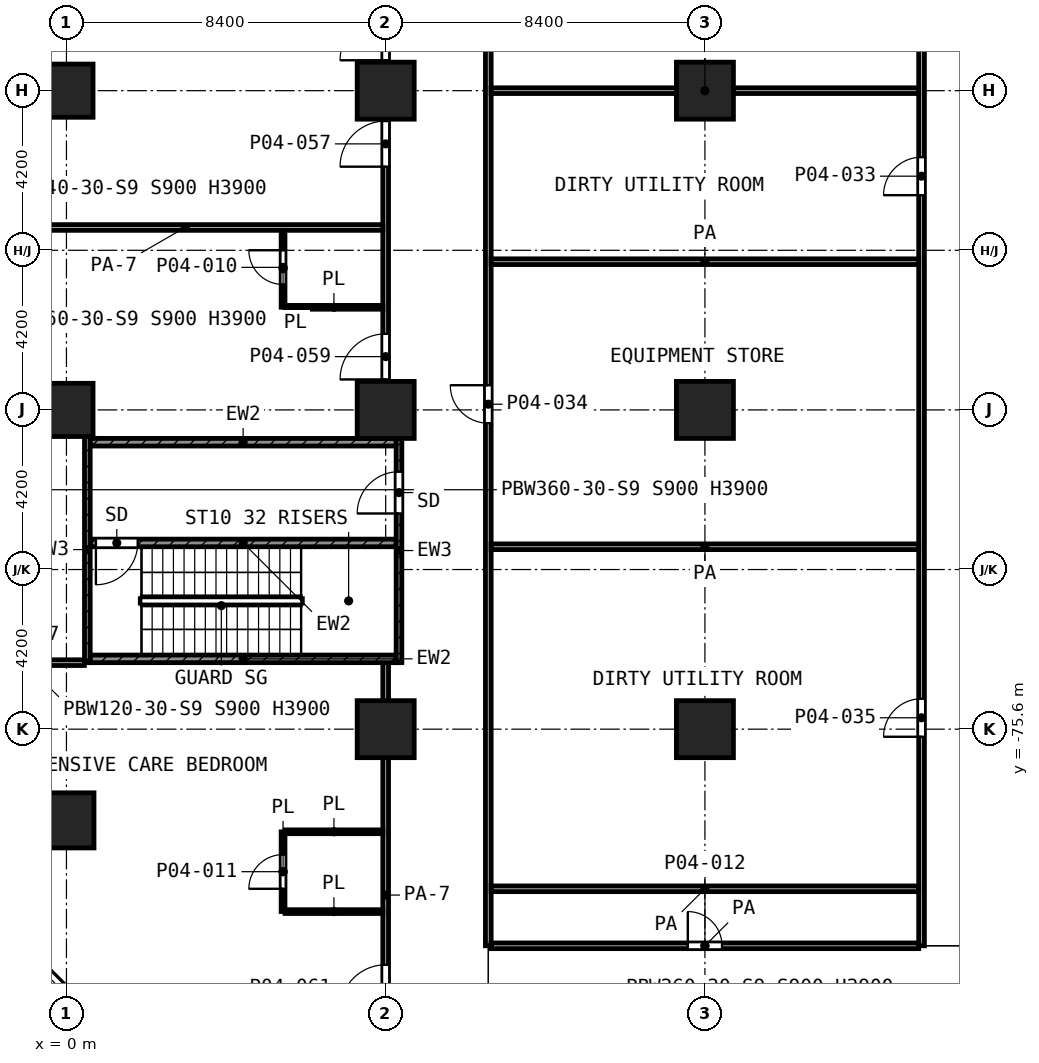
"""IFC4 building model, lengths in metres.
Left out: names, types, materials, properties, quantities, classifications, styles, units other than length and angle.
Written with IfcOpenShell. Run it as: python <this file> out.ifc"""

import sys

from ifc_helpers import new_model, si_unit, direction, frame, frame_2d, origin, origin_2d, place, context, subcontext, project, spatial, rectangle, extrude, element, fill, save


model = new_model("IFC4")
c1 = context("Model", 3, precision=1e-05, world=origin(), true_north=direction((0.0, 1.0)))
c2 = subcontext(c1, "Body", "Model", "MODEL_VIEW")
j1 = project(units=[si_unit("LENGTHUNIT", "METRE"), si_unit("PLANEANGLEUNIT", "RADIAN")], contexts=[c1])
p1 = place(None, origin())
s1 = spatial("IfcSite", under=j1, at=p1, CompositionType="ELEMENT")
p2 = place(p1, origin())
s2 = spatial("IfcBuilding", under=s1, at=p2, CompositionType="ELEMENT")
p3 = place(p2, frame((0.0, 0.0, 18.2)))
s3 = spatial("IfcBuildingStorey", under=s2, at=p3, CompositionType="ELEMENT", Elevation=18.2)
p4 = place(p3, frame((0.0, -58.8, 0.0), z_axis=(0.0, 0.0, 1.0), x_axis=(1.0, 0.0, 0.0)))
e1 = element("IfcColumn", 1, at=p4, inside=s3, PredefinedType="COLUMN", context=c2, shape_type="SweptSolid", body=[
    extrude(rectangle(XDim=1.4, YDim=1.4, at=origin_2d()), origin(), (0.0, 0.0, 1.0), 5.6),
])
for number, where, z_axis, x_axis in (
    (2, (8.4, -58.8, 0.0), (0.0, 0.0, 1.0), (1.0, 0.0, 0.0)),
    (3, (16.8, -58.8, 0.0), (0.0, 0.0, 1.0), (1.0, 0.0, 0.0)),
):
    element("IfcColumn", number, at=place(p3, frame(where, z_axis=z_axis, x_axis=x_axis)), inside=s3, PredefinedType="COLUMN", context=c2, shape_type="SweptSolid", body=[
        extrude(rectangle(XDim=1.5, YDim=1.5, at=origin_2d()), origin(), (0.0, 0.0, 1.0), 5.6),
    ])
p5 = place(p3, frame((0.0, -67.2, 0.0), z_axis=(0.0, 0.0, 1.0), x_axis=(1.0, 0.0, 0.0)))
e4 = element("IfcColumn", 4, at=p5, inside=s3, PredefinedType="COLUMN", context=c2, shape_type="SweptSolid", body=[
    extrude(rectangle(XDim=1.4, YDim=1.4, at=origin_2d()), origin(), (0.0, 0.0, 1.0), 5.6),
])
for number, where, z_axis, x_axis in (
    (5, (8.4, -67.2, 0.0), (0.0, 0.0, 1.0), (1.0, 0.0, 0.0)),
    (6, (16.8, -67.2, 0.0), (0.0, 0.0, 1.0), (1.0, 0.0, 0.0)),
    (7, (8.4, -75.6, 0.0), (0.0, 0.0, 1.0), (1.0, 0.0, 0.0)),
    (8, (16.8, -75.6, 0.0), (0.0, 0.0, 1.0), (1.0, 0.0, 0.0)),
):
    element("IfcColumn", number, at=place(p3, frame(where, z_axis=z_axis, x_axis=x_axis)), inside=s3, PredefinedType="COLUMN", context=c2, shape_type="SweptSolid", body=[
        extrude(rectangle(XDim=1.5, YDim=1.5, at=origin_2d()), origin(), (0.0, 0.0, 1.0), 5.6),
    ])
p6 = place(p3, frame((0.0, -78.0, 0.0), z_axis=(0.0, 0.0, 1.0), x_axis=(1.0, 0.0, 0.0)))
e9 = element("IfcColumn", 9, at=p6, inside=s3, PredefinedType="COLUMN", context=c2, shape_type="SweptSolid", body=[
    extrude(rectangle(XDim=1.45, YDim=1.45, at=origin_2d()), origin(), (0.0, 0.0, 1.0), 5.6),
])
p7 = place(p3, frame((-2.25, -80.338, 0.0), z_axis=(0.0, 0.0, 1.0), x_axis=(0.707106781187, -0.707106781187, 0.0)))
e10 = element("IfcWall", 10, at=p7, inside=s3, PredefinedType="SOLIDWALL", context=c2, shape_type="SweptSolid", body=[
    extrude(rectangle(XDim=8.361, YDim=0.3, at=frame_2d((4.181, 0.0))), origin(), (0.0, 0.0, 1.0), 5.05),
])
p8 = place(p7, frame((0.259, 0.0, 0.9)))
e11 = element("IfcOpeningElement", 11, at=p8, cuts=e10, PredefinedType="OPENING", context=c2, shape_type="SweptSolid", body=[
    extrude(rectangle(XDim=3.6, YDim=3.0, at=frame_2d((1.8, 1.5))), frame((0.0, 0.16, 0.0), z_axis=(0.0, -1.0, 0.0), x_axis=(1.0, 0.0, 0.0)), (0.0, 0.0, 1.0), 0.32),
])
p9 = place(p7, frame((4.502, 0.0, 0.9)))
e12 = element("IfcOpeningElement", 12, at=p9, cuts=e10, PredefinedType="OPENING", context=c2, shape_type="SweptSolid", body=[
    extrude(rectangle(XDim=3.6, YDim=3.0, at=frame_2d((1.8, 1.5))), frame((0.0, 0.16, 0.0), z_axis=(0.0, -1.0, 0.0), x_axis=(1.0, 0.0, 0.0)), (0.0, 0.0, 1.0), 0.32),
])
p10 = place(p3, frame((0.55, -73.85, 0.0), z_axis=(0.0, 0.0, 1.0), x_axis=(0.0, 1.0, 0.0)))
e13 = element("IfcWall", 13, at=p10, inside=s3, PredefinedType="SHEAR", context=c2, shape_type="SweptSolid", body=[
    extrude(rectangle(XDim=5.95, YDim=0.15, at=frame_2d((2.975, 0.0))), origin(), (0.0, 0.0, 1.0), 5.05),
])
p11 = place(p3, frame((8.75, -73.85, 0.0), z_axis=(0.0, 0.0, 1.0), x_axis=(0.0, 1.0, 0.0)))
e14 = element("IfcWall", 14, at=p11, inside=s3, PredefinedType="SHEAR", context=c2, shape_type="SweptSolid", body=[
    extrude(rectangle(XDim=5.9, YDim=0.15, at=frame_2d((2.95, 0.0))), origin(), (0.0, 0.0, 1.0), 5.05),
])
p12 = place(p11, frame((3.925, 0.0, 0.0)))
e15 = element("IfcOpeningElement", 15, at=p12, cuts=e14, PredefinedType="OPENING", context=c2, shape_type="SweptSolid", body=[
    extrude(rectangle(XDim=1.1, YDim=2.1, at=frame_2d((0.55, 1.05))), frame((0.0, 0.085, 0.0), z_axis=(0.0, -1.0, 0.0), x_axis=(1.0, 0.0, 0.0)), (0.0, 0.0, 1.0), 0.17),
])
p13 = place(p3, frame((0.625, -73.75, 0.0), z_axis=(0.0, 0.0, 1.0), x_axis=(1.0, 0.0, 0.0)))
e16 = element("IfcWall", 16, at=p13, inside=s3, PredefinedType="SHEAR", context=c2, shape_type="SweptSolid", body=[
    extrude(rectangle(XDim=8.05, YDim=0.2, at=frame_2d((4.025, 0.0))), origin(), (0.0, 0.0, 1.0), 5.05),
])
p14 = place(p3, frame((0.625, -70.7, 0.0), z_axis=(0.0, 0.0, 1.0), x_axis=(1.0, 0.0, 0.0)))
e17 = element("IfcWall", 17, at=p14, inside=s3, PredefinedType="SHEAR", context=c2, shape_type="SweptSolid", body=[
    extrude(rectangle(XDim=8.05, YDim=0.2, at=frame_2d((4.025, 0.0))), origin(), (0.0, 0.0, 1.0), 5.05),
])
p15 = place(p14, frame((0.15, 0.0, 0.0)))
e18 = element("IfcOpeningElement", 18, at=p15, cuts=e17, PredefinedType="OPENING", context=c2, shape_type="SweptSolid", body=[
    extrude(rectangle(XDim=1.1, YDim=2.1, at=frame_2d((0.55, 1.05))), frame((0.0, 0.11, 0.0), z_axis=(0.0, -1.0, 0.0), x_axis=(1.0, 0.0, 0.0)), (0.0, 0.0, 1.0), 0.22),
])
p16 = place(p3, frame((0.625, -68.05, 0.0), z_axis=(0.0, 0.0, 1.0), x_axis=(1.0, 0.0, 0.0)))
e19 = element("IfcWall", 19, at=p16, inside=s3, PredefinedType="SHEAR", context=c2, shape_type="SweptSolid", body=[
    extrude(rectangle(XDim=8.05, YDim=0.2, at=frame_2d((4.025, 0.0))), origin(), (0.0, 0.0, 1.0), 5.05),
])
p17 = place(p3, frame((5.751, -80.4, 0.0), z_axis=(0.0, 0.0, 1.0), x_axis=(1.0, 0.0, 0.0)))
e20 = element("IfcWall", 20, at=p17, inside=s3, PredefinedType="PARTITIONING", context=c2, shape_type="SweptSolid", body=[
    extrude(rectangle(XDim=2.574, YDim=0.1, at=frame_2d((1.287, 0.0))), origin(), (0.0, 0.0, 1.0), 5.05),
])
p18 = place(p3, frame((5.752, -78.3, 0.0), z_axis=(0.0, 0.0, 1.0), x_axis=(1.0, 0.0, 0.0)))
e21 = element("IfcWall", 21, at=p18, inside=s3, PredefinedType="PARTITIONING", context=c2, shape_type="SweptSolid", body=[
    extrude(rectangle(XDim=2.573, YDim=0.1, at=frame_2d((1.287, 0.0))), origin(), (0.0, 0.0, 1.0), 5.05),
])
p19 = place(p3, frame((5.751, -64.5, 0.0), z_axis=(0.0, 0.0, 1.0), x_axis=(1.0, 0.0, 0.0)))
e22 = element("IfcWall", 22, at=p19, inside=s3, PredefinedType="PARTITIONING", context=c2, shape_type="SweptSolid", body=[
    extrude(rectangle(XDim=2.574, YDim=0.1, at=frame_2d((1.287, 0.0))), origin(), (0.0, 0.0, 1.0), 5.05),
])
p20 = place(p3, frame((5.7, -80.398, 0.0), z_axis=(0.0, 0.0, 1.0), x_axis=(0.0, 1.0, 0.0)))
e23 = element("IfcWall", 23, at=p20, inside=s3, PredefinedType="PARTITIONING", context=c2, shape_type="SweptSolid", body=[
    extrude(rectangle(XDim=2.096, YDim=0.1, at=frame_2d((1.048, 0.0))), origin(), (0.0, 0.0, 1.0), 5.05),
])
p21 = place(p20, frame((0.598, 0.0, 0.0)))
e24 = element("IfcOpeningElement", 24, at=p21, cuts=e23, PredefinedType="OPENING", context=c2, shape_type="SweptSolid", body=[
    extrude(rectangle(XDim=0.9, YDim=2.1, at=frame_2d((0.45, 1.05))), frame((0.0, 0.06, 0.0), z_axis=(0.0, -1.0, 0.0), x_axis=(1.0, 0.0, 0.0)), (0.0, 0.0, 1.0), 0.12),
])
p22 = place(p3, frame((5.7, -64.498, 0.0), z_axis=(0.0, 0.0, 1.0), x_axis=(0.0, 1.0, 0.0)))
e25 = element("IfcWall", 25, at=p22, inside=s3, PredefinedType="PARTITIONING", context=c2, shape_type="SweptSolid", body=[
    extrude(rectangle(XDim=2.023, YDim=0.1, at=frame_2d((1.011, 0.0))), origin(), (0.0, 0.0, 1.0), 5.05),
])
p23 = place(p22, frame((0.599, 0.0, 0.0)))
e26 = element("IfcOpeningElement", 26, at=p23, cuts=e25, PredefinedType="OPENING", context=c2, shape_type="SweptSolid", body=[
    extrude(rectangle(XDim=0.9, YDim=2.1, at=frame_2d((0.45, 1.05))), frame((0.0, 0.06, 0.0), z_axis=(0.0, -1.0, 0.0), x_axis=(1.0, 0.0, 0.0)), (0.0, 0.0, 1.0), 0.12),
])
p24 = place(p3, frame((11.175, -81.3, 0.0), z_axis=(0.0, 0.0, 1.0), x_axis=(1.0, 0.0, 0.0)))
e27 = element("IfcWall", 27, at=p24, inside=s3, PredefinedType="PARTITIONING", context=c2, shape_type="SweptSolid", body=[
    extrude(rectangle(XDim=11.25, YDim=0.15, at=frame_2d((5.625, 0.0))), origin(), (0.0, 0.0, 1.0), 5.05),
])
p25 = place(p24, frame((5.175, 0.0, 0.0)))
e28 = element("IfcOpeningElement", 28, at=p25, cuts=e27, PredefinedType="OPENING", context=c2, shape_type="SweptSolid", body=[
    extrude(rectangle(XDim=0.9, YDim=2.1, at=frame_2d((0.45, 1.05))), frame((0.0, 0.085, 0.0), z_axis=(0.0, -1.0, 0.0), x_axis=(1.0, 0.0, 0.0)), (0.0, 0.0, 1.0), 0.17),
])
p26 = place(p3, frame((11.175, -79.8, 0.0), z_axis=(0.0, 0.0, 1.0), x_axis=(1.0, 0.0, 0.0)))
e29 = element("IfcWall", 29, at=p26, inside=s3, PredefinedType="PARTITIONING", context=c2, shape_type="SweptSolid", body=[
    extrude(rectangle(XDim=11.25, YDim=0.15, at=frame_2d((5.625, 0.0))), origin(), (0.0, 0.0, 1.0), 5.05),
])
p27 = place(p3, frame((-2.08, -73.85, 0.0), z_axis=(0.0, 0.0, 1.0), x_axis=(1.0, 0.0, 0.0)))
e30 = element("IfcWall", 30, at=p27, inside=s3, PredefinedType="PARTITIONING", context=c2, shape_type="SweptSolid", body=[
    extrude(rectangle(XDim=2.552, YDim=0.15, at=frame_2d((1.276, 0.0))), origin(), (0.0, 0.0, 1.0), 3.65),
])
for number, where, z_axis, x_axis in (
    (31, (11.175, -70.8, 0.0), (0.0, 0.0, 1.0), (1.0, 0.0, 0.0)),
    (32, (11.175, -63.3, 0.0), (0.0, 0.0, 1.0), (1.0, 0.0, 0.0)),
):
    element("IfcWall", number, at=place(p3, frame(where, z_axis=z_axis, x_axis=x_axis)), inside=s3, PredefinedType="PARTITIONING", context=c2, shape_type="SweptSolid", body=[
        extrude(rectangle(XDim=11.25, YDim=0.15, at=frame_2d((5.625, 0.0))), origin(), (0.0, 0.0, 1.0), 5.05),
    ])
p28 = place(p3, frame((-2.08, -62.4, 0.0), z_axis=(0.0, 0.0, 1.0), x_axis=(1.0, 0.0, 0.0)))
e33 = element("IfcWall", 33, at=p28, inside=s3, PredefinedType="PARTITIONING", context=c2, shape_type="SweptSolid", body=[
    extrude(rectangle(XDim=10.405, YDim=0.15, at=frame_2d((5.203, 0.0))), origin(), (0.0, 0.0, 1.0), 3.65),
])
p29 = place(p3, frame((11.175, -58.8, 0.0), z_axis=(0.0, 0.0, 1.0), x_axis=(1.0, 0.0, 0.0)))
e34 = element("IfcWall", 34, at=p29, inside=s3, PredefinedType="PARTITIONING", context=c2, shape_type="SweptSolid", body=[
    extrude(rectangle(XDim=11.25, YDim=0.15, at=frame_2d((5.625, 0.0))), origin(), (0.0, 0.0, 1.0), 5.05),
])
p30 = place(p3, frame((8.4, -86.08, 0.0), z_axis=(0.0, 0.0, 1.0), x_axis=(0.0, 1.0, 0.0)))
e35 = element("IfcWall", 35, at=p30, inside=s3, PredefinedType="PARTITIONING", context=c2, shape_type="SweptSolid", body=[
    extrude(rectangle(XDim=12.23, YDim=0.15, at=frame_2d((6.115, 0.0))), origin(), (0.0, 0.0, 1.0), 3.65),
])
p31 = place(p30, frame((1.08, 0.0, 0.0)))
e36 = element("IfcOpeningElement", 36, at=p31, cuts=e35, PredefinedType="OPENING", context=c2, shape_type="SweptSolid", body=[
    extrude(rectangle(XDim=1.2, YDim=2.1, at=frame_2d((0.6, 1.05))), frame((0.0, 0.085, 0.0), z_axis=(0.0, -1.0, 0.0), x_axis=(1.0, 0.0, 0.0)), (0.0, 0.0, 1.0), 0.17),
])
p32 = place(p30, frame((3.08, 0.0, 0.0)))
e37 = element("IfcOpeningElement", 37, at=p32, cuts=e35, PredefinedType="OPENING", context=c2, shape_type="SweptSolid", body=[
    extrude(rectangle(XDim=1.2, YDim=2.1, at=frame_2d((0.6, 1.05))), frame((0.0, 0.085, 0.0), z_axis=(0.0, -1.0, 0.0), x_axis=(1.0, 0.0, 0.0)), (0.0, 0.0, 1.0), 0.17),
])
p33 = place(p3, frame((8.4, -67.947, 0.0), z_axis=(0.0, 0.0, 1.0), x_axis=(0.0, 1.0, 0.0)))
e38 = element("IfcWall", 38, at=p33, inside=s3, PredefinedType="PARTITIONING", context=c2, shape_type="SweptSolid", body=[
    extrude(rectangle(XDim=25.597, YDim=0.15, at=frame_2d((12.798, 0.0))), origin(), (0.0, 0.0, 1.0), 5.05),
])
p34 = place(p33, frame((18.347, 0.0, 0.0)))
e39 = element("IfcOpeningElement", 39, at=p34, cuts=e38, PredefinedType="OPENING", context=c2, shape_type="SweptSolid", body=[
    extrude(rectangle(XDim=1.2, YDim=2.1, at=frame_2d((0.6, 1.05))), frame((0.0, 0.085, 0.0), z_axis=(0.0, -1.0, 0.0), x_axis=(1.0, 0.0, 0.0)), (0.0, 0.0, 1.0), 0.17),
])
p35 = place(p33, frame((7.147, 0.0, 0.0)))
e40 = element("IfcOpeningElement", 40, at=p35, cuts=e38, PredefinedType="OPENING", context=c2, shape_type="SweptSolid", body=[
    extrude(rectangle(XDim=1.2, YDim=2.1, at=frame_2d((0.6, 1.05))), frame((0.0, 0.085, 0.0), z_axis=(0.0, -1.0, 0.0), x_axis=(1.0, 0.0, 0.0)), (0.0, 0.0, 1.0), 0.17),
])
p36 = place(p33, frame((9.947, 0.0, 0.0)))
e41 = element("IfcOpeningElement", 41, at=p36, cuts=e38, PredefinedType="OPENING", context=c2, shape_type="SweptSolid", body=[
    extrude(rectangle(XDim=1.2, YDim=2.1, at=frame_2d((0.6, 1.05))), frame((0.0, 0.085, 0.0), z_axis=(0.0, -1.0, 0.0), x_axis=(1.0, 0.0, 0.0)), (0.0, 0.0, 1.0), 0.17),
])
p37 = place(p33, frame((1.549, 0.0, 0.0)))
e42 = element("IfcOpeningElement", 42, at=p37, cuts=e38, PredefinedType="OPENING", context=c2, shape_type="SweptSolid", body=[
    extrude(rectangle(XDim=1.2, YDim=2.1, at=frame_2d((0.6, 1.05))), frame((0.0, 0.085, 0.0), z_axis=(0.0, -1.0, 0.0), x_axis=(1.0, 0.0, 0.0)), (0.0, 0.0, 1.0), 0.17),
])
p38 = place(p3, frame((11.1, -81.3, 0.0), z_axis=(0.0, 0.0, 1.0), x_axis=(0.0, 1.0, 0.0)))
e43 = element("IfcWall", 43, at=p38, inside=s3, PredefinedType="PARTITIONING", context=c2, shape_type="SweptSolid", body=[
    extrude(rectangle(XDim=51.9, YDim=0.15, at=frame_2d((25.95, 0.0))), origin(), (0.0, 0.0, 1.0), 5.05),
])
p39 = place(p38, frame((34.6, 0.0, 0.0)))
e44 = element("IfcOpeningElement", 44, at=p39, cuts=e43, PredefinedType="OPENING", context=c2, shape_type="SweptSolid", body=[
    extrude(rectangle(XDim=1.0, YDim=2.1, at=frame_2d((0.5, 1.05))), frame((0.0, 0.085, 0.0), z_axis=(0.0, -1.0, 0.0), x_axis=(1.0, 0.0, 0.0)), (0.0, 0.0, 1.0), 0.17),
])
p40 = place(p38, frame((26.2, 0.0, 0.0)))
e45 = element("IfcOpeningElement", 45, at=p40, cuts=e43, PredefinedType="OPENING", context=c2, shape_type="SweptSolid", body=[
    extrude(rectangle(XDim=1.0, YDim=2.1, at=frame_2d((0.5, 1.05))), frame((0.0, 0.085, 0.0), z_axis=(0.0, -1.0, 0.0), x_axis=(1.0, 0.0, 0.0)), (0.0, 0.0, 1.0), 0.17),
])
p41 = place(p38, frame((13.75, 0.0, 0.0)))
e46 = element("IfcOpeningElement", 46, at=p41, cuts=e43, PredefinedType="OPENING", context=c2, shape_type="SweptSolid", body=[
    extrude(rectangle(XDim=1.0, YDim=2.1, at=frame_2d((0.5, 1.05))), frame((0.0, 0.085, 0.0), z_axis=(0.0, -1.0, 0.0), x_axis=(1.0, 0.0, 0.0)), (0.0, 0.0, 1.0), 0.17),
])
p42 = place(p3, frame((22.5, -81.3, 0.0), z_axis=(0.0, 0.0, 1.0), x_axis=(0.0, 1.0, 0.0)))
e47 = element("IfcWall", 47, at=p42, inside=s3, PredefinedType="PARTITIONING", context=c2, shape_type="SweptSolid", body=[
    extrude(rectangle(XDim=56.1, YDim=0.15, at=frame_2d((28.05, 0.0))), origin(), (0.0, 0.0, 1.0), 5.05),
])
p43 = place(p42, frame((51.4, 0.0, 0.0)))
e48 = element("IfcOpeningElement", 48, at=p43, cuts=e47, PredefinedType="OPENING", context=c2, shape_type="SweptSolid", body=[
    extrude(rectangle(XDim=1.0, YDim=2.1, at=frame_2d((0.5, 1.05))), frame((0.0, 0.085, 0.0), z_axis=(0.0, -1.0, 0.0), x_axis=(1.0, 0.0, 0.0)), (0.0, 0.0, 1.0), 0.17),
])
p44 = place(p42, frame((43.0, 0.0, 0.0)))
e49 = element("IfcOpeningElement", 49, at=p44, cuts=e47, PredefinedType="OPENING", context=c2, shape_type="SweptSolid", body=[
    extrude(rectangle(XDim=1.0, YDim=2.1, at=frame_2d((0.5, 1.05))), frame((0.0, 0.085, 0.0), z_axis=(0.0, -1.0, 0.0), x_axis=(1.0, 0.0, 0.0)), (0.0, 0.0, 1.0), 0.17),
])
p45 = place(p42, frame((19.75, 0.0, 0.0)))
e50 = element("IfcOpeningElement", 50, at=p45, cuts=e47, PredefinedType="OPENING", context=c2, shape_type="SweptSolid", body=[
    extrude(rectangle(XDim=1.0, YDim=2.1, at=frame_2d((0.5, 1.05))), frame((0.0, 0.085, 0.0), z_axis=(0.0, -1.0, 0.0), x_axis=(1.0, 0.0, 0.0)), (0.0, 0.0, 1.0), 0.17),
])
p46 = place(p42, frame((5.5, 0.0, 0.0)))
e51 = element("IfcOpeningElement", 51, at=p46, cuts=e47, PredefinedType="OPENING", context=c2, shape_type="SweptSolid", body=[
    extrude(rectangle(XDim=1.0, YDim=2.1, at=frame_2d((0.5, 1.05))), frame((0.0, 0.085, 0.0), z_axis=(0.0, -1.0, 0.0), x_axis=(1.0, 0.0, 0.0)), (0.0, 0.0, 1.0), 0.17),
])
p47 = place(p8, origin())
e52 = element("IfcWindow", 52, at=p47, inside=s3, PartitioningType="SINGLE_PANEL", PredefinedType="WINDOW", context=c2, shape_type="SweptSolid", body=[
    extrude(rectangle(XDim=3.6, YDim=3.0, at=frame_2d((1.8, 1.5))), frame((0.0, 0.03, 0.0), z_axis=(0.0, -1.0, 0.0), x_axis=(1.0, 0.0, 0.0)), (0.0, 0.0, 1.0), 0.06),
])
fill(e11, e52)
p48 = place(p15, frame((1.1, 0.0, 0.0), z_axis=(0.0, 0.0, 1.0), x_axis=(-1.0, 0.0, 0.0)))
e53 = element("IfcDoor", 53, at=p48, inside=s3, OperationType="SINGLE_SWING_LEFT", PredefinedType="DOOR", context=c2, shape_type="SweptSolid", body=[
    extrude(rectangle(XDim=1.1, YDim=2.1, at=frame_2d((0.55, 1.05))), frame((0.0, 0.025, 0.0), z_axis=(0.0, -1.0, 0.0), x_axis=(1.0, 0.0, 0.0)), (0.0, 0.0, 1.0), 0.05),
])
fill(e18, e53)
p49 = place(p12, origin())
e54 = element("IfcDoor", 54, at=p49, inside=s3, OperationType="SINGLE_SWING_LEFT", PredefinedType="DOOR", context=c2, shape_type="SweptSolid", body=[
    extrude(rectangle(XDim=1.1, YDim=2.1, at=frame_2d((0.55, 1.05))), frame((0.0, 0.025, 0.0), z_axis=(0.0, -1.0, 0.0), x_axis=(1.0, 0.0, 0.0)), (0.0, 0.0, 1.0), 0.05),
])
fill(e15, e54)
p50 = place(p35, origin())
e55 = element("IfcDoor", 55, at=p50, inside=s3, OperationType="SINGLE_SWING_LEFT", PredefinedType="DOOR", context=c2, shape_type="SweptSolid", body=[
    extrude(rectangle(XDim=1.2, YDim=2.1, at=frame_2d((0.6, 1.05))), frame((0.0, 0.025, 0.0), z_axis=(0.0, -1.0, 0.0), x_axis=(1.0, 0.0, 0.0)), (0.0, 0.0, 1.0), 0.05),
])
fill(e40, e55)
p51 = place(p36, origin())
e56 = element("IfcDoor", 56, at=p51, inside=s3, OperationType="SINGLE_SWING_LEFT", PredefinedType="DOOR", context=c2, shape_type="SweptSolid", body=[
    extrude(rectangle(XDim=1.2, YDim=2.1, at=frame_2d((0.6, 1.05))), frame((0.0, 0.025, 0.0), z_axis=(0.0, -1.0, 0.0), x_axis=(1.0, 0.0, 0.0)), (0.0, 0.0, 1.0), 0.05),
])
fill(e41, e56)
p52 = place(p37, origin())
e57 = element("IfcDoor", 57, at=p52, inside=s3, OperationType="SINGLE_SWING_LEFT", PredefinedType="DOOR", context=c2, shape_type="SweptSolid", body=[
    extrude(rectangle(XDim=1.2, YDim=2.1, at=frame_2d((0.6, 1.05))), frame((0.0, 0.025, 0.0), z_axis=(0.0, -1.0, 0.0), x_axis=(1.0, 0.0, 0.0)), (0.0, 0.0, 1.0), 0.05),
])
fill(e42, e57)
p53 = place(p23, origin())
e58 = element("IfcDoor", 58, at=p53, inside=s3, OperationType="SINGLE_SWING_RIGHT", PredefinedType="DOOR", context=c2, shape_type="SweptSolid", body=[
    extrude(rectangle(XDim=0.9, YDim=2.1, at=frame_2d((0.45, 1.05))), frame((0.0, 0.025, 0.0), z_axis=(0.0, -1.0, 0.0), x_axis=(1.0, 0.0, 0.0)), (0.0, 0.0, 1.0), 0.05),
])
fill(e26, e58)
p54 = place(p32, origin())
e59 = element("IfcDoor", 59, at=p54, inside=s3, OperationType="SINGLE_SWING_LEFT", PredefinedType="DOOR", context=c2, shape_type="SweptSolid", body=[
    extrude(rectangle(XDim=1.2, YDim=2.1, at=frame_2d((0.6, 1.05))), frame((0.0, 0.025, 0.0), z_axis=(0.0, -1.0, 0.0), x_axis=(1.0, 0.0, 0.0)), (0.0, 0.0, 1.0), 0.05),
])
fill(e37, e59)
p55 = place(p21, origin())
e60 = element("IfcDoor", 60, at=p55, inside=s3, OperationType="SINGLE_SWING_LEFT", PredefinedType="DOOR", context=c2, shape_type="SweptSolid", body=[
    extrude(rectangle(XDim=0.9, YDim=2.1, at=frame_2d((0.45, 1.05))), frame((0.0, 0.025, 0.0), z_axis=(0.0, -1.0, 0.0), x_axis=(1.0, 0.0, 0.0)), (0.0, 0.0, 1.0), 0.05),
])
fill(e24, e60)
p56 = place(p45, origin())
e61 = element("IfcDoor", 61, at=p56, inside=s3, OperationType="SINGLE_SWING_LEFT", PredefinedType="DOOR", context=c2, shape_type="SweptSolid", body=[
    extrude(rectangle(XDim=1.0, YDim=2.1, at=frame_2d((0.5, 1.05))), frame((0.0, 0.025, 0.0), z_axis=(0.0, -1.0, 0.0), x_axis=(1.0, 0.0, 0.0)), (0.0, 0.0, 1.0), 0.05),
])
fill(e50, e61)
p57 = place(p41, origin())
e62 = element("IfcDoor", 62, at=p57, inside=s3, OperationType="SINGLE_SWING_RIGHT", PredefinedType="DOOR", context=c2, shape_type="SweptSolid", body=[
    extrude(rectangle(XDim=1.0, YDim=2.1, at=frame_2d((0.5, 1.05))), frame((0.0, 0.025, 0.0), z_axis=(0.0, -1.0, 0.0), x_axis=(1.0, 0.0, 0.0)), (0.0, 0.0, 1.0), 0.05),
])
fill(e46, e62)
p58 = place(p46, origin())
e63 = element("IfcDoor", 63, at=p58, inside=s3, OperationType="SINGLE_SWING_LEFT", PredefinedType="DOOR", context=c2, shape_type="SweptSolid", body=[
    extrude(rectangle(XDim=1.0, YDim=2.1, at=frame_2d((0.5, 1.05))), frame((0.0, 0.025, 0.0), z_axis=(0.0, -1.0, 0.0), x_axis=(1.0, 0.0, 0.0)), (0.0, 0.0, 1.0), 0.05),
])
fill(e51, e63)
p59 = place(p25, origin())
e64 = element("IfcDoor", 64, at=p59, inside=s3, OperationType="SINGLE_SWING_LEFT", PredefinedType="DOOR", context=c2, shape_type="SweptSolid", body=[
    extrude(rectangle(XDim=0.9, YDim=2.1, at=frame_2d((0.45, 1.05))), frame((0.0, 0.025, 0.0), z_axis=(0.0, -1.0, 0.0), x_axis=(1.0, 0.0, 0.0)), (0.0, 0.0, 1.0), 0.05),
])
fill(e28, e64)
save(model, sys.argv[1])
